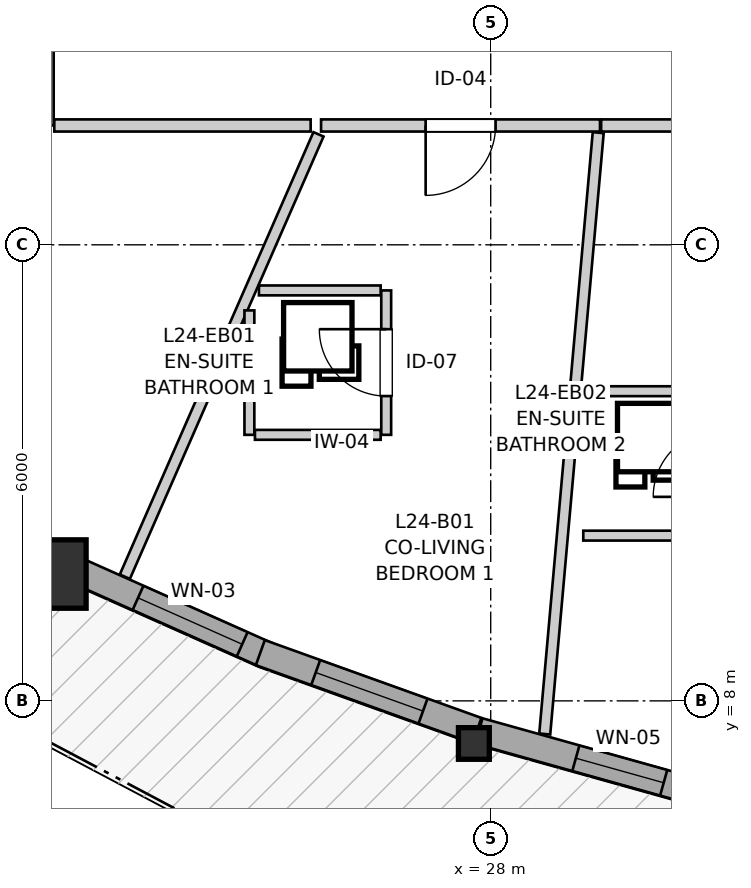
"""IFC4 building model, lengths in metres.
Left out: names, types, materials, properties, quantities, classifications, styles, units other than length and angle.
Written with IfcOpenShell. Run it as: python <this file> out.ifc"""

import sys

from ifc_helpers import new_model, si_unit, direction, frame, frame_2d, origin, origin_2d, place, context, subcontext, project, spatial, rectangle, i_section, extrude, source, transform, mapped, element, fill, save


model = new_model("IFC4")
c1 = context("Model", 3, precision=1e-05, world=origin(), true_north=direction((0.0, 1.0)))
c2 = subcontext(c1, "Body", "Model", "MODEL_VIEW")
j1 = project(units=[si_unit("LENGTHUNIT", "METRE"), si_unit("PLANEANGLEUNIT", "RADIAN")], contexts=[c1])
p1 = place(None, origin())
s1 = spatial("IfcSite", under=j1, at=p1, CompositionType="ELEMENT")
p2 = place(p1, origin())
s2 = spatial("IfcBuilding", under=s1, at=p2, CompositionType="ELEMENT")
p3 = place(p2, frame((0.0, 0.0, 83.2)))
s3 = spatial("IfcBuildingStorey", under=s2, at=p3, CompositionType="ELEMENT", Elevation=83.2)
m1 = source(origin(), c2, "Body", "SweptSolid", [
    extrude(rectangle(XDim=0.9, YDim=0.9, at=origin_2d()), origin(), (0.0, 0.0, 1.0), 2.935),
])
p4 = place(p3, frame((22.227, 9.669, 0.0), z_axis=(0.0, 0.0, 1.0), x_axis=(1.0, 0.0, 0.0)))
e1 = element("IfcColumn", 1, at=p4, inside=s3, PredefinedType="COLUMN", context=c2, shape_type="MappedRepresentation", body=[
    mapped(m1, transform((0.0, 0.0, 0.0), x_axis=(1.0, 0.0, 0.0), y_axis=(0.0, 1.0, 0.0), z_axis=(0.0, 0.0, 1.0), scale=1.0)),
])
m2 = source(origin(), c2, "Body", "SweptSolid", [
    extrude(i_section(OverallWidth=0.406, OverallDepth=0.416, WebThickness=0.027, FlangeThickness=0.044, FilletRadius=0.015, at=origin_2d()), origin(), (0.0, 0.0, 1.0), 2.935),
])
p5 = place(p3, frame((27.779, 7.439, 0.0), z_axis=(0.0, 0.0, 1.0), x_axis=(1.0, 0.0, 0.0)))
e2 = element("IfcColumn", 2, at=p5, inside=s3, PredefinedType="PILASTER", context=c2, shape_type="MappedRepresentation", body=[
    mapped(m2, transform((0.0, 0.0, 0.0), x_axis=(1.0, 0.0, 0.0), y_axis=(0.0, 1.0, 0.0), z_axis=(0.0, 0.0, 1.0), scale=1.0)),
])
p6 = place(p3, frame((22.503, 9.737, 0.0), z_axis=(0.0, 0.0, 1.0), x_axis=(0.913443049169, -0.406966578388, 0.0)))
e3 = element("IfcWall", 3, at=p6, inside=s3, PredefinedType="SOLIDWALL", context=c2, shape_type="SweptSolid", body=[
    extrude(rectangle(XDim=2.79, YDim=0.35, at=frame_2d((1.395, 0.0))), origin(), (0.0, 0.0, 1.0), 2.465),
])
p7 = place(p6, frame((0.938, 0.0, 0.82)))
e4 = element("IfcOpeningElement", 4, at=p7, cuts=e3, PredefinedType="OPENING", context=c2, shape_type="SweptSolid", body=[
    extrude(rectangle(XDim=1.5, YDim=1.45, at=frame_2d((0.75, 0.725))), frame((0.0, 0.185, 0.0), z_axis=(0.0, -1.0, 0.0), x_axis=(1.0, 0.0, 0.0)), (0.0, 0.0, 1.0), 0.37),
])
p8 = place(p3, frame((24.969, 8.635, 0.0), z_axis=(0.0, 0.0, 1.0), x_axis=(0.941099972293, -0.338128440315, 0.0)))
e5 = element("IfcWall", 5, at=p8, inside=s3, PredefinedType="SOLIDWALL", context=c2, shape_type="SweptSolid", body=[
    extrude(rectangle(XDim=3.028, YDim=0.35, at=frame_2d((1.514, 0.0))), origin(), (0.0, 0.0, 1.0), 2.465),
])
p9 = place(p8, frame((0.774, 0.0, 0.82)))
e6 = element("IfcOpeningElement", 6, at=p9, cuts=e5, PredefinedType="OPENING", context=c2, shape_type="SweptSolid", body=[
    extrude(rectangle(XDim=1.5, YDim=1.45, at=frame_2d((0.75, 0.725))), frame((0.0, 0.185, 0.0), z_axis=(0.0, -1.0, 0.0), x_axis=(1.0, 0.0, 0.0)), (0.0, 0.0, 1.0), 0.37),
])
p10 = place(p3, frame((27.845, 7.603, 0.0), z_axis=(0.0, 0.0, 1.0), x_axis=(0.963041412051, -0.269353371382, 0.0)))
e7 = element("IfcWall", 7, at=p10, inside=s3, PredefinedType="SOLIDWALL", context=c2, shape_type="SweptSolid", body=[
    extrude(rectangle(XDim=3.078, YDim=0.35, at=frame_2d((1.539, 0.0))), origin(), (0.0, 0.0, 1.0), 2.465),
])
p11 = place(p10, frame((1.324, 0.0, 0.82)))
e8 = element("IfcOpeningElement", 8, at=p11, cuts=e7, PredefinedType="OPENING", context=c2, shape_type="SweptSolid", body=[
    extrude(rectangle(XDim=1.2, YDim=1.45, at=frame_2d((0.6, 0.725))), frame((0.0, 0.185, 0.0), z_axis=(0.0, -1.0, 0.0), x_axis=(1.0, 0.0, 0.0)), (0.0, 0.0, 1.0), 0.37),
])
p12 = place(p3, frame((22.17, 15.57, 0.0), z_axis=(0.0, 0.0, 1.0), x_axis=(0.0, 1.0, 0.0)))
e9 = element("IfcWall", 9, at=p12, inside=s3, PredefinedType="PARTITIONING", context=c2, shape_type="SweptSolid", body=[
    extrude(rectangle(XDim=5.543, YDim=0.16, at=frame_2d((2.771, 0.0))), origin(), (0.0, 0.0, 1.0), 2.935),
])
p13 = place(p12, frame((2.283, 0.0, 0.0)))
e10 = element("IfcOpeningElement", 10, at=p13, cuts=e9, PredefinedType="OPENING", context=c2, shape_type="SweptSolid", body=[
    extrude(rectangle(XDim=0.96, YDim=2.1, at=frame_2d((0.48, 1.05))), frame((0.0, 0.09, 0.0), z_axis=(0.0, -1.0, 0.0), x_axis=(1.0, 0.0, 0.0)), (0.0, 0.0, 1.0), 0.18),
])
p14 = place(p3, frame((29.438, 15.57, 0.0), z_axis=(0.0, 0.0, 1.0), x_axis=(-1.0, 0.0, 0.0)))
e11 = element("IfcWall", 11, at=p14, inside=s3, PredefinedType="PARTITIONING", context=c2, shape_type="SweptSolid", body=[
    extrude(rectangle(XDim=3.67, YDim=0.16, at=frame_2d((1.835, 0.0))), origin(), (0.0, 0.0, 1.0), 2.935),
])
p15 = place(p14, frame((1.374, 0.0, 0.0)))
e12 = element("IfcOpeningElement", 12, at=p15, cuts=e11, PredefinedType="OPENING", context=c2, shape_type="SweptSolid", body=[
    extrude(rectangle(XDim=0.92, YDim=2.1, at=frame_2d((0.46, 1.05))), frame((0.0, 0.09, 0.0), z_axis=(0.0, -1.0, 0.0), x_axis=(1.0, 0.0, 0.0)), (0.0, 0.0, 1.0), 0.18),
])
p16 = place(p3, frame((32.525, 15.57, 0.0), z_axis=(0.0, 0.0, 1.0), x_axis=(-1.0, 0.0, 0.0)))
e13 = element("IfcWall", 13, at=p16, inside=s3, PredefinedType="PARTITIONING", context=c2, shape_type="SweptSolid", body=[
    extrude(rectangle(XDim=3.072, YDim=0.16, at=frame_2d((1.536, 0.0))), origin(), (0.0, 0.0, 1.0), 2.935),
])
p17 = place(p16, frame((1.098, 0.0, 0.0)))
e14 = element("IfcOpeningElement", 14, at=p17, cuts=e13, PredefinedType="OPENING", context=c2, shape_type="SweptSolid", body=[
    extrude(rectangle(XDim=0.92, YDim=2.1, at=frame_2d((0.46, 1.05))), frame((0.0, 0.09, 0.0), z_axis=(0.0, -1.0, 0.0), x_axis=(1.0, 0.0, 0.0)), (0.0, 0.0, 1.0), 0.18),
])
p18 = place(p3, frame((26.625, 11.5, 0.0), z_axis=(0.0, 0.0, 1.0), x_axis=(0.0, 1.0, 0.0)))
e15 = element("IfcWall", 15, at=p18, inside=s3, PredefinedType="PARTITIONING", context=c2, shape_type="SweptSolid", body=[
    extrude(rectangle(XDim=1.9, YDim=0.13, at=frame_2d((0.95, 0.0))), origin(), (0.0, 0.0, 1.0), 2.935),
])
p19 = place(p18, frame((0.51, 0.0, 0.0)))
e16 = element("IfcOpeningElement", 16, at=p19, cuts=e15, PredefinedType="OPENING", context=c2, shape_type="SweptSolid", body=[
    extrude(rectangle(XDim=0.88, YDim=2.05, at=frame_2d((0.44, 1.025))), frame((0.0, 0.075, 0.0), z_axis=(0.0, -1.0, 0.0), x_axis=(1.0, 0.0, 0.0)), (0.0, 0.0, 1.0), 0.15),
])
p20 = place(p3, frame((28.711, 7.564, 0.0), z_axis=(0.0, 0.0, 1.0), x_axis=(0.088615013812, 0.996065951294, 0.0)))
e17 = element("IfcWall", 17, at=p20, inside=s3, PredefinedType="PARTITIONING", context=c2, shape_type="SweptSolid", body=[
    extrude(rectangle(XDim=7.943, YDim=0.145, at=frame_2d((3.971, 0.0))), origin(), (0.0, 0.0, 1.0), 2.935),
])
p21 = place(p3, frame((23.186, 9.634, 0.0), z_axis=(0.0, 0.0, 1.0), x_axis=(0.400994208685, 0.916080588486, 0.0)))
e18 = element("IfcWall", 18, at=p21, inside=s3, PredefinedType="PARTITIONING", context=c2, shape_type="SweptSolid", body=[
    extrude(rectangle(XDim=6.353, YDim=0.145, at=frame_2d((3.177, 0.0))), origin(), (0.0, 0.0, 1.0), 2.935),
])
p22 = place(p3, frame((22.258, 15.57, 0.0), z_axis=(0.0, 0.0, 1.0), x_axis=(1.0, 0.0, 0.0)))
e19 = element("IfcWall", 19, at=p22, inside=s3, PredefinedType="PARTITIONING", context=c2, shape_type="SweptSolid", body=[
    extrude(rectangle(XDim=3.373, YDim=0.16, at=frame_2d((1.687, 0.0))), origin(), (0.0, 0.0, 1.0), 2.935),
])
p23 = place(p3, frame((24.825, 11.5, 0.0), z_axis=(0.0, 0.0, 1.0), x_axis=(0.0, 1.0, 0.0)))
e20 = element("IfcWall", 20, at=p23, inside=s3, PredefinedType="PARTITIONING", context=c2, shape_type="SweptSolid", body=[
    extrude(rectangle(XDim=1.637, YDim=0.13, at=frame_2d((0.818, 0.0))), origin(), (0.0, 0.0, 1.0), 2.935),
])
p24 = place(p3, frame((24.898, 11.5, 0.0), z_axis=(0.0, 0.0, 1.0), x_axis=(1.0, 0.0, 0.0)))
e21 = element("IfcWall", 21, at=p24, inside=s3, PredefinedType="PARTITIONING", context=c2, shape_type="SweptSolid", body=[
    extrude(rectangle(XDim=1.654, YDim=0.13, at=frame_2d((0.827, 0.0))), origin(), (0.0, 0.0, 1.0), 2.543),
])
p25 = place(p3, frame((29.305, 12.074, 0.0), z_axis=(0.0, 0.0, 1.0), x_axis=(1.0, 0.0, 0.0)))
e22 = element("IfcWall", 22, at=p25, inside=s3, PredefinedType="PARTITIONING", context=c2, shape_type="SweptSolid", body=[
    extrude(rectangle(XDim=1.64, YDim=0.13, at=frame_2d((0.82, 0.0))), origin(), (0.0, 0.0, 1.0), 2.935),
])
p26 = place(p3, frame((29.218, 10.174, 0.0), z_axis=(0.0, 0.0, 1.0), x_axis=(1.0, 0.0, 0.0)))
e23 = element("IfcWall", 23, at=p26, inside=s3, PredefinedType="PARTITIONING", context=c2, shape_type="SweptSolid", body=[
    extrude(rectangle(XDim=1.727, YDim=0.13, at=frame_2d((0.864, 0.0))), origin(), (0.0, 0.0, 1.0), 2.543),
])
p27 = place(p3, frame((24.951, 13.4, 0.0), z_axis=(0.0, 0.0, 1.0), x_axis=(1.0, 0.0, 0.0)))
e24 = element("IfcWall", 24, at=p27, inside=s3, PredefinedType="PARTITIONING", context=c2, shape_type="SweptSolid", body=[
    extrude(rectangle(XDim=1.601, YDim=0.13, at=frame_2d((0.801, 0.0))), origin(), (0.0, 0.0, 1.0), 2.935),
])
m3 = source(origin(), c2, "Body", "SweptSolid", [
    extrude(rectangle(XDim=1.5, YDim=1.45, at=frame_2d((0.75, 0.725))), frame((0.0, 0.03, 0.0), z_axis=(0.0, -1.0, 0.0), x_axis=(1.0, 0.0, 0.0)), (0.0, 0.0, 1.0), 0.06),
])
p28 = place(p7, origin())
e25 = element("IfcWindow", 25, at=p28, inside=s3, PartitioningType="SINGLE_PANEL", PredefinedType="WINDOW", context=c2, shape_type="MappedRepresentation", body=[
    mapped(m3, transform((0.0, 0.0, 0.0), x_axis=(1.0, 0.0, 0.0), y_axis=(0.0, 1.0, 0.0), z_axis=(0.0, 0.0, 1.0), scale=1.0)),
])
fill(e4, e25)
p29 = place(p9, origin())
e26 = element("IfcWindow", 26, at=p29, inside=s3, PartitioningType="SINGLE_PANEL", PredefinedType="WINDOW", context=c2, shape_type="MappedRepresentation", body=[
    mapped(m3, transform((0.0, 0.0, 0.0), x_axis=(1.0, 0.0, 0.0), y_axis=(0.0, 1.0, 0.0), z_axis=(0.0, 0.0, 1.0), scale=1.0)),
])
fill(e6, e26)
m4 = source(origin(), c2, "Body", "SweptSolid", [
    extrude(rectangle(XDim=1.2, YDim=1.45, at=frame_2d((0.6, 0.725))), frame((0.0, 0.03, 0.0), z_axis=(0.0, -1.0, 0.0), x_axis=(1.0, 0.0, 0.0)), (0.0, 0.0, 1.0), 0.06),
])
p30 = place(p11, origin())
e27 = element("IfcWindow", 27, at=p30, inside=s3, PartitioningType="SINGLE_PANEL", PredefinedType="WINDOW", context=c2, shape_type="MappedRepresentation", body=[
    mapped(m4, transform((0.0, 0.0, 0.0), x_axis=(1.0, 0.0, 0.0), y_axis=(0.0, 1.0, 0.0), z_axis=(0.0, 0.0, 1.0), scale=1.0)),
])
fill(e8, e27)
m5 = source(origin(), c2, "Body", "SweptSolid", [
    extrude(rectangle(XDim=0.92, YDim=2.1, at=frame_2d((0.46, 1.05))), frame((0.0, 0.025, 0.0), z_axis=(0.0, -1.0, 0.0), x_axis=(1.0, 0.0, 0.0)), (0.0, 0.0, 1.0), 0.05),
])
p31 = place(p15, origin())
e28 = element("IfcDoor", 28, at=p31, inside=s3, OperationType="SINGLE_SWING_RIGHT", PredefinedType="DOOR", context=c2, shape_type="MappedRepresentation", body=[
    mapped(m5, transform((0.0, 0.0, 0.0), x_axis=(1.0, 0.0, 0.0), y_axis=(0.0, 1.0, 0.0), z_axis=(0.0, 0.0, 1.0), scale=1.0)),
])
fill(e12, e28)
m6 = source(origin(), c2, "Body", "SweptSolid", [
    extrude(rectangle(XDim=0.88, YDim=2.05, at=frame_2d((0.44, 1.025))), frame((0.0, 0.025, 0.0), z_axis=(0.0, -1.0, 0.0), x_axis=(1.0, 0.0, 0.0)), (0.0, 0.0, 1.0), 0.05),
])
p32 = place(p19, origin())
e29 = element("IfcDoor", 29, at=p32, inside=s3, OperationType="SINGLE_SWING_RIGHT", PredefinedType="DOOR", context=c2, shape_type="MappedRepresentation", body=[
    mapped(m6, transform((0.0, 0.0, 0.0), x_axis=(1.0, 0.0, 0.0), y_axis=(0.0, 1.0, 0.0), z_axis=(0.0, 0.0, 1.0), scale=1.0)),
])
fill(e16, e29)
save(model, sys.argv[1])
